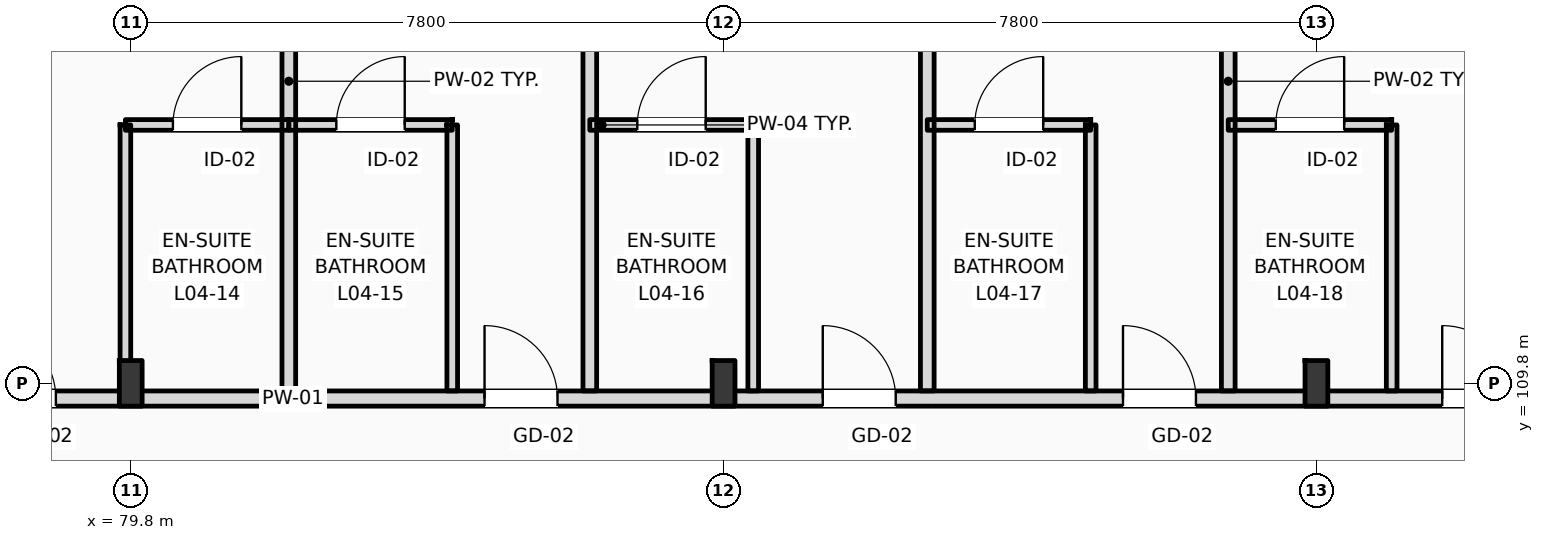
"""IFC4 building model, lengths in metres.
Left out: names, types, materials, properties, quantities, classifications, styles, units other than length and angle.
Written with IfcOpenShell. Run it as: python <this file> out.ifc"""

import sys

from ifc_helpers import new_model, si_unit, direction, frame, frame_2d, origin, origin_2d, place, context, subcontext, project, spatial, rectangle, i_section, extrude, element, fill, save


model = new_model("IFC4")
c1 = context("Model", 3, precision=1e-05, world=origin(), true_north=direction((0.0, 1.0)))
c2 = subcontext(c1, "Body", "Model", "MODEL_VIEW")
j1 = project(units=[si_unit("LENGTHUNIT", "METRE"), si_unit("PLANEANGLEUNIT", "RADIAN")], contexts=[c1])
p1 = place(None, origin())
s1 = spatial("IfcSite", under=j1, at=p1, CompositionType="ELEMENT")
p2 = place(p1, origin())
s2 = spatial("IfcBuilding", under=s1, at=p2, CompositionType="ELEMENT")
p3 = place(p2, frame((0.0, 0.0, 20.4)))
s3 = spatial("IfcBuildingStorey", under=s2, at=p3, CompositionType="ELEMENT", Elevation=20.4)
for number, where, z_axis, x_axis in (
    (1, (79.8, 109.8, 0.0), (0.0, 0.0, 1.0), (1.0, 0.0, 0.0)),
    (2, (87.6, 109.8, 0.0), (0.0, 0.0, 1.0), (1.0, 0.0, 0.0)),
    (3, (95.4, 109.8, 0.0), (0.0, 0.0, 1.0), (1.0, 0.0, 0.0)),
):
    element("IfcColumn", number, at=place(p3, frame(where, z_axis=z_axis, x_axis=x_axis)), inside=s3, PredefinedType="COLUMN", context=c2, shape_type="SweptSolid", body=[
        extrude(i_section(OverallWidth=0.3, OverallDepth=0.6, WebThickness=0.015, FlangeThickness=0.03, FilletRadius=0.027, at=origin_2d()), origin(), (0.0, 0.0, 1.0), 4.2),
    ])
p4 = place(p3, frame((10.65, 109.6, 0.0), z_axis=(0.0, 0.0, 1.0), x_axis=(1.0, 0.0, 0.0)))
e4 = element("IfcWall", 4, at=p4, inside=s3, PredefinedType="PARTITIONING", context=c2, shape_type="SweptSolid", body=[
    extrude(rectangle(XDim=109.21, YDim=0.2, at=frame_2d((54.605, 0.0))), origin(), (0.0, 0.0, 1.0), 3.38),
])
p5 = place(p4, frame((12.535, 0.0, 0.0)))
e5 = element("IfcOpeningElement", 5, at=p5, cuts=e4, PredefinedType="OPENING", context=c2, shape_type="SweptSolid", body=[
    extrude(rectangle(XDim=1.02, YDim=2.2, at=frame_2d((0.51, 1.1))), frame((0.0, 0.11, 0.0), z_axis=(0.0, -1.0, 0.0), x_axis=(1.0, 0.0, 0.0)), (0.0, 0.0, 1.0), 0.22),
])
p6 = place(p4, frame((19.175, 0.0, 0.0)))
e6 = element("IfcOpeningElement", 6, at=p6, cuts=e4, PredefinedType="OPENING", context=c2, shape_type="SweptSolid", body=[
    extrude(rectangle(XDim=1.02, YDim=2.2, at=frame_2d((0.51, 1.1))), frame((0.0, 0.11, 0.0), z_axis=(0.0, -1.0, 0.0), x_axis=(1.0, 0.0, 0.0)), (0.0, 0.0, 1.0), 0.22),
])
p7 = place(p4, frame((23.375, 0.0, 0.0)))
e7 = element("IfcOpeningElement", 7, at=p7, cuts=e4, PredefinedType="OPENING", context=c2, shape_type="SweptSolid", body=[
    extrude(rectangle(XDim=1.02, YDim=2.2, at=frame_2d((0.51, 1.1))), frame((0.0, 0.11, 0.0), z_axis=(0.0, -1.0, 0.0), x_axis=(1.0, 0.0, 0.0)), (0.0, 0.0, 1.0), 0.22),
])
p8 = place(p4, frame((27.575, 0.0, 0.0)))
e8 = element("IfcOpeningElement", 8, at=p8, cuts=e4, PredefinedType="OPENING", context=c2, shape_type="SweptSolid", body=[
    extrude(rectangle(XDim=1.02, YDim=2.2, at=frame_2d((0.51, 1.1))), frame((0.0, 0.11, 0.0), z_axis=(0.0, -1.0, 0.0), x_axis=(1.0, 0.0, 0.0)), (0.0, 0.0, 1.0), 0.22),
])
p9 = place(p4, frame((31.805, 0.0, 0.0)))
e9 = element("IfcOpeningElement", 9, at=p9, cuts=e4, PredefinedType="OPENING", context=c2, shape_type="SweptSolid", body=[
    extrude(rectangle(XDim=0.96, YDim=2.2, at=frame_2d((0.48, 1.1))), frame((0.0, 0.11, 0.0), z_axis=(0.0, -1.0, 0.0), x_axis=(1.0, 0.0, 0.0)), (0.0, 0.0, 1.0), 0.22),
])
p10 = place(p4, frame((33.855, 0.0, 0.0)))
e10 = element("IfcOpeningElement", 10, at=p10, cuts=e4, PredefinedType="OPENING", context=c2, shape_type="SweptSolid", body=[
    extrude(rectangle(XDim=0.96, YDim=2.2, at=frame_2d((0.48, 1.1))), frame((0.0, 0.11, 0.0), z_axis=(0.0, -1.0, 0.0), x_axis=(1.0, 0.0, 0.0)), (0.0, 0.0, 1.0), 0.22),
])
p11 = place(p4, frame((40.205, 0.0, 0.0)))
e11 = element("IfcOpeningElement", 11, at=p11, cuts=e4, PredefinedType="OPENING", context=c2, shape_type="SweptSolid", body=[
    extrude(rectangle(XDim=0.96, YDim=2.2, at=frame_2d((0.48, 1.1))), frame((0.0, 0.11, 0.0), z_axis=(0.0, -1.0, 0.0), x_axis=(1.0, 0.0, 0.0)), (0.0, 0.0, 1.0), 0.22),
])
p12 = place(p4, frame((42.255, 0.0, 0.0)))
e12 = element("IfcOpeningElement", 12, at=p12, cuts=e4, PredefinedType="OPENING", context=c2, shape_type="SweptSolid", body=[
    extrude(rectangle(XDim=0.96, YDim=2.2, at=frame_2d((0.48, 1.1))), frame((0.0, 0.11, 0.0), z_axis=(0.0, -1.0, 0.0), x_axis=(1.0, 0.0, 0.0)), (0.0, 0.0, 1.0), 0.22),
])
p13 = place(p4, frame((48.605, 0.0, 0.0)))
e13 = element("IfcOpeningElement", 13, at=p13, cuts=e4, PredefinedType="OPENING", context=c2, shape_type="SweptSolid", body=[
    extrude(rectangle(XDim=0.96, YDim=2.2, at=frame_2d((0.48, 1.1))), frame((0.0, 0.11, 0.0), z_axis=(0.0, -1.0, 0.0), x_axis=(1.0, 0.0, 0.0)), (0.0, 0.0, 1.0), 0.22),
])
p14 = place(p4, frame((50.655, 0.0, 0.0)))
e14 = element("IfcOpeningElement", 14, at=p14, cuts=e4, PredefinedType="OPENING", context=c2, shape_type="SweptSolid", body=[
    extrude(rectangle(XDim=0.96, YDim=2.2, at=frame_2d((0.48, 1.1))), frame((0.0, 0.11, 0.0), z_axis=(0.0, -1.0, 0.0), x_axis=(1.0, 0.0, 0.0)), (0.0, 0.0, 1.0), 0.22),
])
p15 = place(p4, frame((57.005, 0.0, 0.0)))
e15 = element("IfcOpeningElement", 15, at=p15, cuts=e4, PredefinedType="OPENING", context=c2, shape_type="SweptSolid", body=[
    extrude(rectangle(XDim=0.96, YDim=2.2, at=frame_2d((0.48, 1.1))), frame((0.0, 0.11, 0.0), z_axis=(0.0, -1.0, 0.0), x_axis=(1.0, 0.0, 0.0)), (0.0, 0.0, 1.0), 0.22),
])
p16 = place(p4, frame((59.055, 0.0, 0.0)))
e16 = element("IfcOpeningElement", 16, at=p16, cuts=e4, PredefinedType="OPENING", context=c2, shape_type="SweptSolid", body=[
    extrude(rectangle(XDim=0.96, YDim=2.2, at=frame_2d((0.48, 1.1))), frame((0.0, 0.11, 0.0), z_axis=(0.0, -1.0, 0.0), x_axis=(1.0, 0.0, 0.0)), (0.0, 0.0, 1.0), 0.22),
])
p17 = place(p4, frame((65.405, 0.0, 0.0)))
e17 = element("IfcOpeningElement", 17, at=p17, cuts=e4, PredefinedType="OPENING", context=c2, shape_type="SweptSolid", body=[
    extrude(rectangle(XDim=0.96, YDim=2.2, at=frame_2d((0.48, 1.1))), frame((0.0, 0.11, 0.0), z_axis=(0.0, -1.0, 0.0), x_axis=(1.0, 0.0, 0.0)), (0.0, 0.0, 1.0), 0.22),
])
p18 = place(p4, frame((67.205, 0.0, 0.0)))
e18 = element("IfcOpeningElement", 18, at=p18, cuts=e4, PredefinedType="OPENING", context=c2, shape_type="SweptSolid", body=[
    extrude(rectangle(XDim=0.96, YDim=2.2, at=frame_2d((0.48, 1.1))), frame((0.0, 0.11, 0.0), z_axis=(0.0, -1.0, 0.0), x_axis=(1.0, 0.0, 0.0)), (0.0, 0.0, 1.0), 0.22),
])
p19 = place(p4, frame((73.805, 0.0, 0.0)))
e19 = element("IfcOpeningElement", 19, at=p19, cuts=e4, PredefinedType="OPENING", context=c2, shape_type="SweptSolid", body=[
    extrude(rectangle(XDim=0.96, YDim=2.2, at=frame_2d((0.48, 1.1))), frame((0.0, 0.11, 0.0), z_axis=(0.0, -1.0, 0.0), x_axis=(1.0, 0.0, 0.0)), (0.0, 0.0, 1.0), 0.22),
])
p20 = place(p4, frame((78.255, 0.0, 0.0)))
e20 = element("IfcOpeningElement", 20, at=p20, cuts=e4, PredefinedType="OPENING", context=c2, shape_type="SweptSolid", body=[
    extrude(rectangle(XDim=0.96, YDim=2.2, at=frame_2d((0.48, 1.1))), frame((0.0, 0.11, 0.0), z_axis=(0.0, -1.0, 0.0), x_axis=(1.0, 0.0, 0.0)), (0.0, 0.0, 1.0), 0.22),
])
p21 = place(p4, frame((82.205, 0.0, 0.0)))
e21 = element("IfcOpeningElement", 21, at=p21, cuts=e4, PredefinedType="OPENING", context=c2, shape_type="SweptSolid", body=[
    extrude(rectangle(XDim=0.96, YDim=2.2, at=frame_2d((0.48, 1.1))), frame((0.0, 0.11, 0.0), z_axis=(0.0, -1.0, 0.0), x_axis=(1.0, 0.0, 0.0)), (0.0, 0.0, 1.0), 0.22),
])
p22 = place(p4, frame((86.405, 0.0, 0.0)))
e22 = element("IfcOpeningElement", 22, at=p22, cuts=e4, PredefinedType="OPENING", context=c2, shape_type="SweptSolid", body=[
    extrude(rectangle(XDim=0.96, YDim=2.2, at=frame_2d((0.48, 1.1))), frame((0.0, 0.11, 0.0), z_axis=(0.0, -1.0, 0.0), x_axis=(1.0, 0.0, 0.0)), (0.0, 0.0, 1.0), 0.22),
])
p23 = place(p4, frame((90.605, 0.0, 0.0)))
e23 = element("IfcOpeningElement", 23, at=p23, cuts=e4, PredefinedType="OPENING", context=c2, shape_type="SweptSolid", body=[
    extrude(rectangle(XDim=0.96, YDim=2.2, at=frame_2d((0.48, 1.1))), frame((0.0, 0.11, 0.0), z_axis=(0.0, -1.0, 0.0), x_axis=(1.0, 0.0, 0.0)), (0.0, 0.0, 1.0), 0.22),
])
p24 = place(p4, frame((94.805, 0.0, 0.0)))
e24 = element("IfcOpeningElement", 24, at=p24, cuts=e4, PredefinedType="OPENING", context=c2, shape_type="SweptSolid", body=[
    extrude(rectangle(XDim=0.96, YDim=2.2, at=frame_2d((0.48, 1.1))), frame((0.0, 0.11, 0.0), z_axis=(0.0, -1.0, 0.0), x_axis=(1.0, 0.0, 0.0)), (0.0, 0.0, 1.0), 0.22),
])
p25 = place(p4, frame((99.005, 0.0, 0.0)))
e25 = element("IfcOpeningElement", 25, at=p25, cuts=e4, PredefinedType="OPENING", context=c2, shape_type="SweptSolid", body=[
    extrude(rectangle(XDim=0.96, YDim=2.2, at=frame_2d((0.48, 1.1))), frame((0.0, 0.11, 0.0), z_axis=(0.0, -1.0, 0.0), x_axis=(1.0, 0.0, 0.0)), (0.0, 0.0, 1.0), 0.22),
])
p26 = place(p4, frame((103.205, 0.0, 0.0)))
e26 = element("IfcOpeningElement", 26, at=p26, cuts=e4, PredefinedType="OPENING", context=c2, shape_type="SweptSolid", body=[
    extrude(rectangle(XDim=0.96, YDim=2.2, at=frame_2d((0.48, 1.1))), frame((0.0, 0.11, 0.0), z_axis=(0.0, -1.0, 0.0), x_axis=(1.0, 0.0, 0.0)), (0.0, 0.0, 1.0), 0.22),
])
p27 = place(p4, frame((105.335, 0.0, 0.0)))
e27 = element("IfcOpeningElement", 27, at=p27, cuts=e4, PredefinedType="OPENING", context=c2, shape_type="SweptSolid", body=[
    extrude(rectangle(XDim=0.96, YDim=2.2, at=frame_2d((0.48, 1.1))), frame((0.0, 0.11, 0.0), z_axis=(0.0, -1.0, 0.0), x_axis=(1.0, 0.0, 0.0)), (0.0, 0.0, 1.0), 0.22),
])
p28 = place(p4, frame((2.716, 0.0, 0.0)))
e28 = element("IfcOpeningElement", 28, at=p28, cuts=e4, PredefinedType="OPENING", context=c2, shape_type="SweptSolid", body=[
    extrude(rectangle(XDim=1.35, YDim=2.25, at=frame_2d((0.675, 1.125))), frame((0.0, 0.11, 0.0), z_axis=(0.0, -1.0, 0.0), x_axis=(1.0, 0.0, 0.0)), (0.0, 0.0, 1.0), 0.22),
])
p29 = place(p4, frame((6.65, 0.0, 0.0)))
e29 = element("IfcOpeningElement", 29, at=p29, cuts=e4, PredefinedType="OPENING", context=c2, shape_type="SweptSolid", body=[
    extrude(rectangle(XDim=1.35, YDim=2.25, at=frame_2d((0.675, 1.125))), frame((0.0, 0.11, 0.0), z_axis=(0.0, -1.0, 0.0), x_axis=(1.0, 0.0, 0.0)), (0.0, 0.0, 1.0), 0.22),
])
p30 = place(p4, frame((10.583, 0.0, 0.0)))
e30 = element("IfcOpeningElement", 30, at=p30, cuts=e4, PredefinedType="OPENING", context=c2, shape_type="SweptSolid", body=[
    extrude(rectangle(XDim=1.35, YDim=2.25, at=frame_2d((0.675, 1.125))), frame((0.0, 0.11, 0.0), z_axis=(0.0, -1.0, 0.0), x_axis=(1.0, 0.0, 0.0)), (0.0, 0.0, 1.0), 0.22),
])
p31 = place(p3, frame((81.88, 109.7, 0.0), z_axis=(0.0, 0.0, 1.0), x_axis=(0.0, 1.0, 0.0)))
e31 = element("IfcWall", 31, at=p31, inside=s3, PredefinedType="PARTITIONING", context=c2, shape_type="SweptSolid", body=[
    extrude(rectangle(XDim=8.15, YDim=0.18, at=frame_2d((4.075, 0.0))), origin(), (0.0, 0.0, 1.0), 3.94),
])
p32 = place(p3, frame((79.73, 109.7, 0.0), z_axis=(0.0, 0.0, 1.0), x_axis=(0.0, 1.0, 0.0)))
e32 = element("IfcWall", 32, at=p32, inside=s3, PredefinedType="PARTITIONING", context=c2, shape_type="SweptSolid", body=[
    extrude(rectangle(XDim=3.5, YDim=0.14, at=frame_2d((1.75, 0.0))), origin(), (0.0, 0.0, 1.0), 3.53),
])
p33 = place(p3, frame((79.73, 113.2, 0.0), z_axis=(0.0, 0.0, 1.0), x_axis=(1.0, 0.0, 0.0)))
e33 = element("IfcWall", 33, at=p33, inside=s3, PredefinedType="PARTITIONING", context=c2, shape_type="SweptSolid", body=[
    extrude(rectangle(XDim=2.15, YDim=0.14, at=frame_2d((1.075, 0.0))), origin(), (0.0, 0.0, 1.0), 3.94),
])
p34 = place(p33, frame((0.625, 0.0, 0.0)))
e34 = element("IfcOpeningElement", 34, at=p34, cuts=e33, PredefinedType="OPENING", context=c2, shape_type="SweptSolid", body=[
    extrude(rectangle(XDim=0.9, YDim=2.1, at=frame_2d((0.45, 1.05))), frame((0.0, 0.08, 0.0), z_axis=(0.0, -1.0, 0.0), x_axis=(1.0, 0.0, 0.0)), (0.0, 0.0, 1.0), 0.16),
])
p35 = place(p3, frame((85.84, 109.7, 0.0), z_axis=(0.0, 0.0, 1.0), x_axis=(0.0, 1.0, 0.0)))
e35 = element("IfcWall", 35, at=p35, inside=s3, PredefinedType="PARTITIONING", context=c2, shape_type="SweptSolid", body=[
    extrude(rectangle(XDim=8.15, YDim=0.18, at=frame_2d((4.075, 0.0))), origin(), (0.0, 0.0, 1.0), 3.94),
])
p36 = place(p3, frame((84.03, 109.7, 0.0), z_axis=(0.0, 0.0, 1.0), x_axis=(0.0, 1.0, 0.0)))
e36 = element("IfcWall", 36, at=p36, inside=s3, PredefinedType="PARTITIONING", context=c2, shape_type="SweptSolid", body=[
    extrude(rectangle(XDim=3.5, YDim=0.14, at=frame_2d((1.75, 0.0))), origin(), (0.0, 0.0, 1.0), 3.94),
])
p37 = place(p3, frame((81.88, 113.2, 0.0), z_axis=(0.0, 0.0, 1.0), x_axis=(1.0, 0.0, 0.0)))
e37 = element("IfcWall", 37, at=p37, inside=s3, PredefinedType="PARTITIONING", context=c2, shape_type="SweptSolid", body=[
    extrude(rectangle(XDim=2.15, YDim=0.14, at=frame_2d((1.075, 0.0))), origin(), (0.0, 0.0, 1.0), 3.94),
])
p38 = place(p37, frame((0.625, 0.0, 0.0)))
e38 = element("IfcOpeningElement", 38, at=p38, cuts=e37, PredefinedType="OPENING", context=c2, shape_type="SweptSolid", body=[
    extrude(rectangle(XDim=0.9, YDim=2.1, at=frame_2d((0.45, 1.05))), frame((0.0, 0.08, 0.0), z_axis=(0.0, -1.0, 0.0), x_axis=(1.0, 0.0, 0.0)), (0.0, 0.0, 1.0), 0.16),
])
p39 = place(p3, frame((90.28, 109.7, 0.0), z_axis=(0.0, 0.0, 1.0), x_axis=(0.0, 1.0, 0.0)))
e39 = element("IfcWall", 39, at=p39, inside=s3, PredefinedType="PARTITIONING", context=c2, shape_type="SweptSolid", body=[
    extrude(rectangle(XDim=8.15, YDim=0.18, at=frame_2d((4.075, 0.0))), origin(), (0.0, 0.0, 1.0), 3.63),
])
p40 = place(p3, frame((87.99, 109.7, 0.0), z_axis=(0.0, 0.0, 1.0), x_axis=(0.0, 1.0, 0.0)))
e40 = element("IfcWall", 40, at=p40, inside=s3, PredefinedType="PARTITIONING", context=c2, shape_type="SweptSolid", body=[
    extrude(rectangle(XDim=3.5, YDim=0.14, at=frame_2d((1.75, 0.0))), origin(), (0.0, 0.0, 1.0), 3.94),
])
p41 = place(p3, frame((85.84, 113.2, 0.0), z_axis=(0.0, 0.0, 1.0), x_axis=(1.0, 0.0, 0.0)))
e41 = element("IfcWall", 41, at=p41, inside=s3, PredefinedType="PARTITIONING", context=c2, shape_type="SweptSolid", body=[
    extrude(rectangle(XDim=2.15, YDim=0.14, at=frame_2d((1.075, 0.0))), origin(), (0.0, 0.0, 1.0), 3.94),
])
p42 = place(p41, frame((0.625, 0.0, 0.0)))
e42 = element("IfcOpeningElement", 42, at=p42, cuts=e41, PredefinedType="OPENING", context=c2, shape_type="SweptSolid", body=[
    extrude(rectangle(XDim=0.9, YDim=2.1, at=frame_2d((0.45, 1.05))), frame((0.0, 0.08, 0.0), z_axis=(0.0, -1.0, 0.0), x_axis=(1.0, 0.0, 0.0)), (0.0, 0.0, 1.0), 0.16),
])
p43 = place(p3, frame((94.24, 109.7, 0.0), z_axis=(0.0, 0.0, 1.0), x_axis=(0.0, 1.0, 0.0)))
e43 = element("IfcWall", 43, at=p43, inside=s3, PredefinedType="PARTITIONING", context=c2, shape_type="SweptSolid", body=[
    extrude(rectangle(XDim=8.15, YDim=0.18, at=frame_2d((4.075, 0.0))), origin(), (0.0, 0.0, 1.0), 3.94),
])
p44 = place(p3, frame((92.43, 109.7, 0.0), z_axis=(0.0, 0.0, 1.0), x_axis=(0.0, 1.0, 0.0)))
e44 = element("IfcWall", 44, at=p44, inside=s3, PredefinedType="PARTITIONING", context=c2, shape_type="SweptSolid", body=[
    extrude(rectangle(XDim=3.5, YDim=0.14, at=frame_2d((1.75, 0.0))), origin(), (0.0, 0.0, 1.0), 3.94),
])
p45 = place(p3, frame((90.28, 113.2, 0.0), z_axis=(0.0, 0.0, 1.0), x_axis=(1.0, 0.0, 0.0)))
e45 = element("IfcWall", 45, at=p45, inside=s3, PredefinedType="PARTITIONING", context=c2, shape_type="SweptSolid", body=[
    extrude(rectangle(XDim=2.15, YDim=0.14, at=frame_2d((1.075, 0.0))), origin(), (0.0, 0.0, 1.0), 3.94),
])
p46 = place(p45, frame((0.625, 0.0, 0.0)))
e46 = element("IfcOpeningElement", 46, at=p46, cuts=e45, PredefinedType="OPENING", context=c2, shape_type="SweptSolid", body=[
    extrude(rectangle(XDim=0.9, YDim=2.1, at=frame_2d((0.45, 1.05))), frame((0.0, 0.08, 0.0), z_axis=(0.0, -1.0, 0.0), x_axis=(1.0, 0.0, 0.0)), (0.0, 0.0, 1.0), 0.16),
])
p47 = place(p3, frame((96.39, 109.7, 0.0), z_axis=(0.0, 0.0, 1.0), x_axis=(0.0, 1.0, 0.0)))
e47 = element("IfcWall", 47, at=p47, inside=s3, PredefinedType="PARTITIONING", context=c2, shape_type="SweptSolid", body=[
    extrude(rectangle(XDim=3.5, YDim=0.14, at=frame_2d((1.75, 0.0))), origin(), (0.0, 0.0, 1.0), 3.94),
])
p48 = place(p3, frame((94.24, 113.2, 0.0), z_axis=(0.0, 0.0, 1.0), x_axis=(1.0, 0.0, 0.0)))
e48 = element("IfcWall", 48, at=p48, inside=s3, PredefinedType="PARTITIONING", context=c2, shape_type="SweptSolid", body=[
    extrude(rectangle(XDim=2.15, YDim=0.14, at=frame_2d((1.075, 0.0))), origin(), (0.0, 0.0, 1.0), 3.94),
])
p49 = place(p48, frame((0.625, 0.0, 0.0)))
e49 = element("IfcOpeningElement", 49, at=p49, cuts=e48, PredefinedType="OPENING", context=c2, shape_type="SweptSolid", body=[
    extrude(rectangle(XDim=0.9, YDim=2.1, at=frame_2d((0.45, 1.05))), frame((0.0, 0.08, 0.0), z_axis=(0.0, -1.0, 0.0), x_axis=(1.0, 0.0, 0.0)), (0.0, 0.0, 1.0), 0.16),
])
p50 = place(p18, origin())
e50 = element("IfcDoor", 50, at=p50, inside=s3, OperationType="SINGLE_SWING_LEFT", PredefinedType="DOOR", context=c2, shape_type="SweptSolid", body=[
    extrude(rectangle(XDim=0.96, YDim=2.2, at=frame_2d((0.48, 1.1))), frame((0.0, 0.025, 0.0), z_axis=(0.0, -1.0, 0.0), x_axis=(1.0, 0.0, 0.0)), (0.0, 0.0, 1.0), 0.05),
])
fill(e18, e50)
p51 = place(p34, origin())
e51 = element("IfcDoor", 51, at=p51, inside=s3, OperationType="SINGLE_SWING_RIGHT", PredefinedType="DOOR", context=c2, shape_type="SweptSolid", body=[
    extrude(rectangle(XDim=0.9, YDim=2.1, at=frame_2d((0.45, 1.05))), frame((0.0, 0.025, 0.0), z_axis=(0.0, -1.0, 0.0), x_axis=(1.0, 0.0, 0.0)), (0.0, 0.0, 1.0), 0.05),
])
fill(e34, e51)
p52 = place(p19, origin())
e52 = element("IfcDoor", 52, at=p52, inside=s3, OperationType="SINGLE_SWING_LEFT", PredefinedType="DOOR", context=c2, shape_type="SweptSolid", body=[
    extrude(rectangle(XDim=0.96, YDim=2.2, at=frame_2d((0.48, 1.1))), frame((0.0, 0.025, 0.0), z_axis=(0.0, -1.0, 0.0), x_axis=(1.0, 0.0, 0.0)), (0.0, 0.0, 1.0), 0.05),
])
fill(e19, e52)
p53 = place(p38, origin())
e53 = element("IfcDoor", 53, at=p53, inside=s3, OperationType="SINGLE_SWING_RIGHT", PredefinedType="DOOR", context=c2, shape_type="SweptSolid", body=[
    extrude(rectangle(XDim=0.9, YDim=2.1, at=frame_2d((0.45, 1.05))), frame((0.0, 0.025, 0.0), z_axis=(0.0, -1.0, 0.0), x_axis=(1.0, 0.0, 0.0)), (0.0, 0.0, 1.0), 0.05),
])
fill(e38, e53)
p54 = place(p20, origin())
e54 = element("IfcDoor", 54, at=p54, inside=s3, OperationType="SINGLE_SWING_LEFT", PredefinedType="DOOR", context=c2, shape_type="SweptSolid", body=[
    extrude(rectangle(XDim=0.96, YDim=2.2, at=frame_2d((0.48, 1.1))), frame((0.0, 0.025, 0.0), z_axis=(0.0, -1.0, 0.0), x_axis=(1.0, 0.0, 0.0)), (0.0, 0.0, 1.0), 0.05),
])
fill(e20, e54)
p55 = place(p42, origin())
e55 = element("IfcDoor", 55, at=p55, inside=s3, OperationType="SINGLE_SWING_RIGHT", PredefinedType="DOOR", context=c2, shape_type="SweptSolid", body=[
    extrude(rectangle(XDim=0.9, YDim=2.1, at=frame_2d((0.45, 1.05))), frame((0.0, 0.025, 0.0), z_axis=(0.0, -1.0, 0.0), x_axis=(1.0, 0.0, 0.0)), (0.0, 0.0, 1.0), 0.05),
])
fill(e42, e55)
p56 = place(p21, origin())
e56 = element("IfcDoor", 56, at=p56, inside=s3, OperationType="SINGLE_SWING_LEFT", PredefinedType="DOOR", context=c2, shape_type="SweptSolid", body=[
    extrude(rectangle(XDim=0.96, YDim=2.2, at=frame_2d((0.48, 1.1))), frame((0.0, 0.025, 0.0), z_axis=(0.0, -1.0, 0.0), x_axis=(1.0, 0.0, 0.0)), (0.0, 0.0, 1.0), 0.05),
])
fill(e21, e56)
p57 = place(p46, origin())
e57 = element("IfcDoor", 57, at=p57, inside=s3, OperationType="SINGLE_SWING_RIGHT", PredefinedType="DOOR", context=c2, shape_type="SweptSolid", body=[
    extrude(rectangle(XDim=0.9, YDim=2.1, at=frame_2d((0.45, 1.05))), frame((0.0, 0.025, 0.0), z_axis=(0.0, -1.0, 0.0), x_axis=(1.0, 0.0, 0.0)), (0.0, 0.0, 1.0), 0.05),
])
fill(e46, e57)
p58 = place(p22, origin())
e58 = element("IfcDoor", 58, at=p58, inside=s3, OperationType="SINGLE_SWING_LEFT", PredefinedType="DOOR", context=c2, shape_type="SweptSolid", body=[
    extrude(rectangle(XDim=0.96, YDim=2.2, at=frame_2d((0.48, 1.1))), frame((0.0, 0.025, 0.0), z_axis=(0.0, -1.0, 0.0), x_axis=(1.0, 0.0, 0.0)), (0.0, 0.0, 1.0), 0.05),
])
fill(e22, e58)
p59 = place(p49, origin())
e59 = element("IfcDoor", 59, at=p59, inside=s3, OperationType="SINGLE_SWING_RIGHT", PredefinedType="DOOR", context=c2, shape_type="SweptSolid", body=[
    extrude(rectangle(XDim=0.9, YDim=2.1, at=frame_2d((0.45, 1.05))), frame((0.0, 0.025, 0.0), z_axis=(0.0, -1.0, 0.0), x_axis=(1.0, 0.0, 0.0)), (0.0, 0.0, 1.0), 0.05),
])
fill(e49, e59)
save(model, sys.argv[1])
